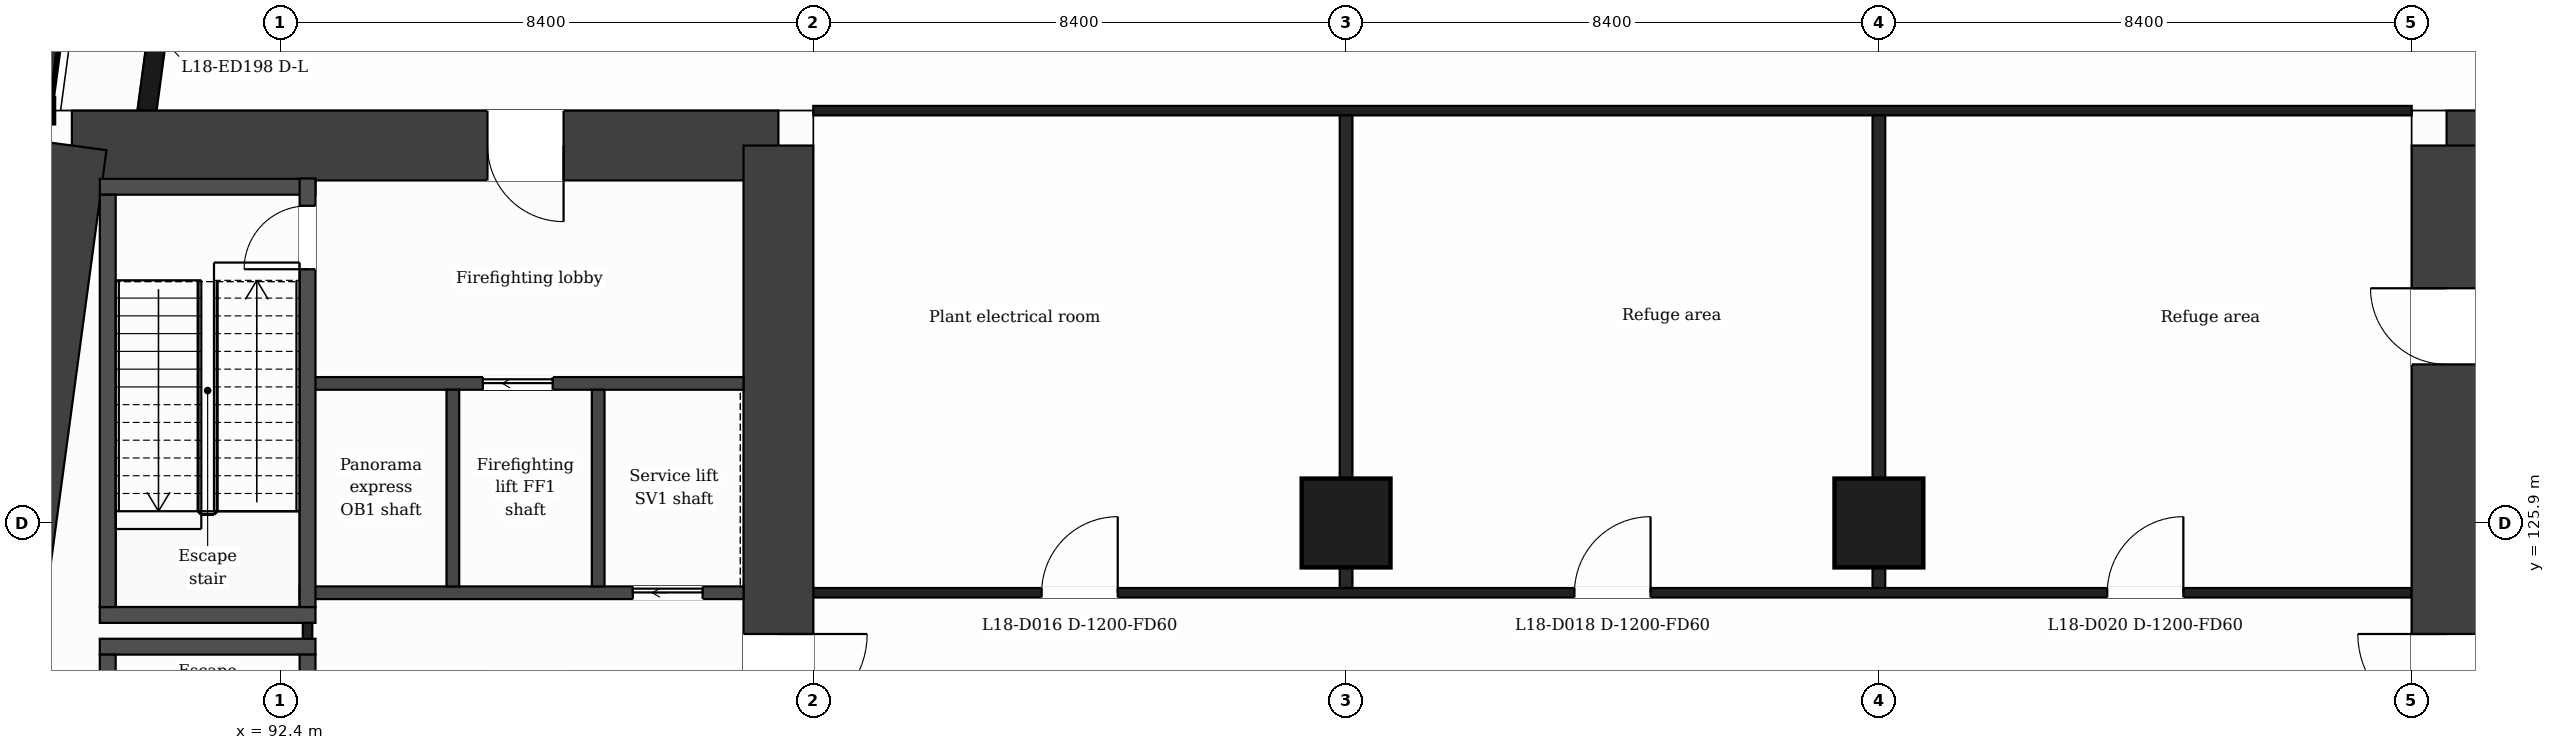
"""IFC4 building model, lengths in metres.
Left out: names, types, materials, properties, quantities, classifications, styles, units other than length and angle.
Written with IfcOpenShell. Run it as: python <this file> out.ifc"""

import sys

from ifc_helpers import new_model, si_unit, direction, frame, frame_2d, origin, origin_2d, place, context, subcontext, project, spatial, rectangle, extrude, element, fill, save


model = new_model("IFC4")
c1 = context("Model", 3, precision=1e-05, world=origin(), true_north=direction((0.0, 1.0)))
c2 = subcontext(c1, "Body", "Model", "MODEL_VIEW")
j1 = project(units=[si_unit("LENGTHUNIT", "METRE"), si_unit("PLANEANGLEUNIT", "RADIAN")], contexts=[c1])
p1 = place(None, origin())
s1 = spatial("IfcSite", under=j1, at=p1, CompositionType="ELEMENT")
p2 = place(p1, origin())
s2 = spatial("IfcBuilding", under=s1, at=p2, CompositionType="ELEMENT")
p3 = place(p2, frame((0.0, 0.0, 81.0)))
s3 = spatial("IfcBuildingStorey", under=s2, at=p3, CompositionType="ELEMENT", Elevation=81.0)
p4 = place(p3, frame((89.112, 131.85, 0.0), z_axis=(0.0, 0.0, 1.0), x_axis=(1.0, 0.0, 0.0)))
e1 = element("IfcWall", 1, at=p4, inside=s3, PredefinedType="SHEAR", context=c2, shape_type="SweptSolid", body=[
    extrude(rectangle(XDim=11.138, YDim=1.1, at=frame_2d((5.569, 0.0))), origin(), (0.0, 0.0, 1.0), 5.0),
])
p5 = place(p4, frame((6.552, 0.0, 0.0)))
e2 = element("IfcOpeningElement", 2, at=p5, cuts=e1, PredefinedType="OPENING", context=c2, shape_type="SweptSolid", body=[
    extrude(rectangle(XDim=1.2, YDim=2.1, at=frame_2d((0.6, 1.05))), frame((0.0, 0.56, 0.0), z_axis=(0.0, -1.0, 0.0), x_axis=(1.0, 0.0, 0.0)), (0.0, 0.0, 1.0), 1.12),
])
p6 = place(p3, frame((100.25, 131.85, 0.0), z_axis=(0.0, 0.0, 1.0), x_axis=(0.0, -1.0, 0.0)))
e3 = element("IfcWall", 3, at=p6, inside=s3, PredefinedType="SHEAR", context=c2, shape_type="SweptSolid", body=[
    extrude(rectangle(XDim=20.9, YDim=1.1, at=frame_2d((10.45, 0.0))), origin(), (0.0, 0.0, 1.0), 5.0),
])
p7 = place(p6, frame((18.55, 0.0, 0.0)))
e4 = element("IfcOpeningElement", 4, at=p7, cuts=e3, PredefinedType="OPENING", context=c2, shape_type="SweptSolid", body=[
    extrude(rectangle(XDim=1.2, YDim=2.1, at=frame_2d((0.6, 1.05))), frame((0.0, 0.56, 0.0), z_axis=(0.0, -1.0, 0.0), x_axis=(1.0, 0.0, 0.0)), (0.0, 0.0, 1.0), 1.12),
])
p8 = place(p6, frame((7.7, 0.0, 0.0)))
e5 = element("IfcOpeningElement", 5, at=p8, cuts=e3, PredefinedType="OPENING", context=c2, shape_type="SweptSolid", body=[
    extrude(rectangle(XDim=1.4, YDim=2.1, at=frame_2d((0.7, 1.05))), frame((0.0, 0.56, 0.0), z_axis=(0.0, -1.0, 0.0), x_axis=(1.0, 0.0, 0.0)), (0.0, 0.0, 1.0), 1.12),
])
p9 = place(p3, frame((86.298, 110.95, 0.0), z_axis=(0.0, 0.0, 1.0), x_axis=(0.133400422634, 0.99106222168, 0.0)))
e6 = element("IfcWall", 6, at=p9, inside=s3, PredefinedType="SHEAR", context=c2, shape_type="SweptSolid", body=[
    extrude(rectangle(XDim=21.089, YDim=1.1, at=frame_2d((10.544, 0.0))), origin(), (0.0, 0.0, 1.0), 5.0),
])
p10 = place(p3, frame((126.55, 131.85, 0.0), z_axis=(0.0, 0.0, 1.0), x_axis=(1.0, 0.0, 0.0)))
e7 = element("IfcWall", 7, at=p10, inside=s3, PredefinedType="SHEAR", context=c2, shape_type="SweptSolid", body=[
    extrude(rectangle(XDim=11.138, YDim=1.1, at=frame_2d((5.569, 0.0))), origin(), (0.0, 0.0, 1.0), 5.0),
])
p11 = place(p10, frame((3.386, 0.0, 0.0)))
e8 = element("IfcOpeningElement", 8, at=p11, cuts=e7, PredefinedType="OPENING", context=c2, shape_type="SweptSolid", body=[
    extrude(rectangle(XDim=1.2, YDim=2.1, at=frame_2d((0.6, 1.05))), frame((0.0, 0.56, 0.0), z_axis=(0.0, -1.0, 0.0), x_axis=(1.0, 0.0, 0.0)), (0.0, 0.0, 1.0), 1.12),
])
p12 = place(p3, frame((126.55, 110.95, 0.0), z_axis=(0.0, 0.0, 1.0), x_axis=(0.0, 1.0, 0.0)))
e9 = element("IfcWall", 9, at=p12, inside=s3, PredefinedType="SHEAR", context=c2, shape_type="SweptSolid", body=[
    extrude(rectangle(XDim=20.9, YDim=1.1, at=frame_2d((10.45, 0.0))), origin(), (0.0, 0.0, 1.0), 5.0),
])
p13 = place(p12, frame((17.45, 0.0, 0.0)))
e10 = element("IfcOpeningElement", 10, at=p13, cuts=e9, PredefinedType="OPENING", context=c2, shape_type="SweptSolid", body=[
    extrude(rectangle(XDim=1.2, YDim=2.1, at=frame_2d((0.6, 1.05))), frame((0.0, 0.56, 0.0), z_axis=(0.0, -1.0, 0.0), x_axis=(1.0, 0.0, 0.0)), (0.0, 0.0, 1.0), 1.12),
])
p14 = place(p12, frame((11.8, 0.0, 0.0)))
e11 = element("IfcOpeningElement", 11, at=p14, cuts=e9, PredefinedType="OPENING", context=c2, shape_type="SweptSolid", body=[
    extrude(rectangle(XDim=1.4, YDim=2.1, at=frame_2d((0.7, 1.05))), frame((0.0, 0.56, 0.0), z_axis=(0.0, -1.0, 0.0), x_axis=(1.0, 0.0, 0.0)), (0.0, 0.0, 1.0), 1.12),
])
for number, where, z_axis, x_axis in (
    (12, (109.2, 125.9, 0.0), (0.0, 0.0, 1.0), (1.0, 0.0, 0.0)),
    (13, (117.6, 125.9, 0.0), (0.0, 0.0, 1.0), (1.0, 0.0, 0.0)),
):
    element("IfcColumn", number, at=place(p3, frame(where, z_axis=z_axis, x_axis=x_axis)), inside=s3, PredefinedType="COLUMN", context=c2, shape_type="SweptSolid", body=[
        extrude(rectangle(XDim=1.4, YDim=1.4, at=origin_2d()), origin(), (0.0, 0.0, 1.0), 5.0),
    ])
p15 = place(p3, frame((91.177, 138.95, 0.0), z_axis=(0.0, 0.0, 1.0), x_axis=(-0.133426664613, -0.991058689065, 0.0)))
e14 = element("IfcWall", 14, at=p15, inside=s3, PredefinedType="SOLIDWALL", context=c2, shape_type="SweptSolid", body=[
    extrude(rectangle(XDim=6.609, YDim=0.3, at=frame_2d((3.305, 0.0))), origin(), (0.0, 0.0, 1.0), 4.55),
])
p16 = place(p15, frame((4.294, 0.0, 0.0)))
e15 = element("IfcOpeningElement", 15, at=p16, cuts=e14, PredefinedType="OPENING", context=c2, shape_type="SweptSolid", body=[
    extrude(rectangle(XDim=1.2, YDim=2.4, at=frame_2d((0.6, 1.2))), frame((0.0, 0.16, 0.0), z_axis=(0.0, -1.0, 0.0), x_axis=(1.0, 0.0, 0.0)), (0.0, 0.0, 1.0), 0.32),
])
for number, where, z_axis, x_axis in (
    (16, (89.552, 123.95, 0.0), (0.0, 0.0, 1.0), (1.0, 0.0, 0.0)),
    (17, (89.552, 124.45, 0.0), (0.0, 0.0, 1.0), (1.0, 0.0, 0.0)),
):
    element("IfcWall", number, at=place(p3, frame(where, z_axis=z_axis, x_axis=x_axis)), inside=s3, PredefinedType="PARTITIONING", context=c2, shape_type="SweptSolid", body=[
        extrude(rectangle(XDim=3.4, YDim=0.25, at=frame_2d((1.7, 0.0))), origin(), (0.0, 0.0, 1.0), 4.55),
    ])
p17 = place(p3, frame((92.702, 124.8, 0.0), z_axis=(0.0, 0.0, 1.0), x_axis=(1.0, 0.0, 0.0)))
e18 = element("IfcWall", 18, at=p17, inside=s3, PredefinedType="PARTITIONING", context=c2, shape_type="SweptSolid", body=[
    extrude(rectangle(XDim=6.998, YDim=0.2, at=frame_2d((3.499, 0.0))), origin(), (0.0, 0.0, 1.0), 4.55),
])
p18 = place(p17, frame((5.253, 0.0, 0.0)))
e19 = element("IfcOpeningElement", 19, at=p18, cuts=e18, PredefinedType="OPENING", context=c2, shape_type="SweptSolid", body=[
    extrude(rectangle(XDim=1.1, YDim=2.1, at=frame_2d((0.55, 1.05))), frame((0.0, 0.11, 0.0), z_axis=(0.0, -1.0, 0.0), x_axis=(1.0, 0.0, 0.0)), (0.0, 0.0, 1.0), 0.22),
])
p19 = place(p3, frame((100.8, 124.8, 0.0), z_axis=(0.0, 0.0, 1.0), x_axis=(1.0, 0.0, 0.0)))
e20 = element("IfcWall", 20, at=p19, inside=s3, PredefinedType="PARTITIONING", context=c2, shape_type="SweptSolid", body=[
    extrude(rectangle(XDim=25.2, YDim=0.15, at=frame_2d((12.6, 0.0))), origin(), (0.0, 0.0, 1.0), 4.55),
])
p20 = place(p19, frame((3.6, 0.0, 0.0)))
e21 = element("IfcOpeningElement", 21, at=p20, cuts=e20, PredefinedType="OPENING", context=c2, shape_type="SweptSolid", body=[
    extrude(rectangle(XDim=1.2, YDim=2.1, at=frame_2d((0.6, 1.05))), frame((0.0, 0.085, 0.0), z_axis=(0.0, -1.0, 0.0), x_axis=(1.0, 0.0, 0.0)), (0.0, 0.0, 1.0), 0.17),
])
p21 = place(p19, frame((12.0, 0.0, 0.0)))
e22 = element("IfcOpeningElement", 22, at=p21, cuts=e20, PredefinedType="OPENING", context=c2, shape_type="SweptSolid", body=[
    extrude(rectangle(XDim=1.2, YDim=2.1, at=frame_2d((0.6, 1.05))), frame((0.0, 0.085, 0.0), z_axis=(0.0, -1.0, 0.0), x_axis=(1.0, 0.0, 0.0)), (0.0, 0.0, 1.0), 0.17),
])
p22 = place(p19, frame((20.4, 0.0, 0.0)))
e23 = element("IfcOpeningElement", 23, at=p22, cuts=e20, PredefinedType="OPENING", context=c2, shape_type="SweptSolid", body=[
    extrude(rectangle(XDim=1.2, YDim=2.1, at=frame_2d((0.6, 1.05))), frame((0.0, 0.085, 0.0), z_axis=(0.0, -1.0, 0.0), x_axis=(1.0, 0.0, 0.0)), (0.0, 0.0, 1.0), 0.17),
])
p23 = place(p3, frame((92.827, 128.1, 0.0), z_axis=(0.0, 0.0, 1.0), x_axis=(1.0, 0.0, 0.0)))
e24 = element("IfcWall", 24, at=p23, inside=s3, PredefinedType="PARTITIONING", context=c2, shape_type="SweptSolid", body=[
    extrude(rectangle(XDim=6.873, YDim=0.2, at=frame_2d((3.437, 0.0))), origin(), (0.0, 0.0, 1.0), 4.55),
])
p24 = place(p23, frame((2.764, 0.0, 0.0)))
e25 = element("IfcOpeningElement", 25, at=p24, cuts=e24, PredefinedType="OPENING", context=c2, shape_type="SweptSolid", body=[
    extrude(rectangle(XDim=1.1, YDim=2.1, at=frame_2d((0.55, 1.05))), frame((0.0, 0.11, 0.0), z_axis=(0.0, -1.0, 0.0), x_axis=(1.0, 0.0, 0.0)), (0.0, 0.0, 1.0), 0.22),
])
p25 = place(p3, frame((89.552, 131.2, 0.0), z_axis=(0.0, 0.0, 1.0), x_axis=(1.0, 0.0, 0.0)))
e26 = element("IfcWall", 26, at=p25, inside=s3, PredefinedType="PARTITIONING", context=c2, shape_type="SweptSolid", body=[
    extrude(rectangle(XDim=3.4, YDim=0.25, at=frame_2d((1.7, 0.0))), origin(), (0.0, 0.0, 1.0), 4.55),
])
p26 = place(p3, frame((100.8, 132.4, 0.0), z_axis=(0.0, 0.0, 1.0), x_axis=(1.0, 0.0, 0.0)))
e27 = element("IfcWall", 27, at=p26, inside=s3, PredefinedType="PARTITIONING", context=c2, shape_type="SweptSolid", body=[
    extrude(rectangle(XDim=25.2, YDim=0.15, at=frame_2d((12.6, 0.0))), origin(), (0.0, 0.0, 1.0), 4.55),
])
p27 = place(p3, frame((89.677, 117.07, 0.0), z_axis=(0.0, 0.0, 1.0), x_axis=(0.0, 1.0, 0.0)))
e28 = element("IfcWall", 28, at=p27, inside=s3, PredefinedType="PARTITIONING", context=c2, shape_type="SweptSolid", body=[
    extrude(rectangle(XDim=6.755, YDim=0.25, at=frame_2d((3.377, 0.0))), origin(), (0.0, 0.0, 1.0), 4.55),
])
p28 = place(p3, frame((89.677, 124.575, 0.0), z_axis=(0.0, 0.0, 1.0), x_axis=(0.0, 1.0, 0.0)))
e29 = element("IfcWall", 29, at=p28, inside=s3, PredefinedType="PARTITIONING", context=c2, shape_type="SweptSolid", body=[
    extrude(rectangle(XDim=6.5, YDim=0.25, at=frame_2d((3.25, 0.0))), origin(), (0.0, 0.0, 1.0), 4.55),
])
p29 = place(p3, frame((92.827, 124.075, 0.0), z_axis=(0.0, 0.0, 1.0), x_axis=(0.0, 1.0, 0.0)))
e30 = element("IfcWall", 30, at=p29, inside=s3, PredefinedType="PARTITIONING", context=c2, shape_type="SweptSolid", body=[
    extrude(rectangle(XDim=0.25, YDim=0.15, at=frame_2d((0.125, 0.0))), origin(), (0.0, 0.0, 1.0), 4.55),
])
p30 = place(p3, frame((92.827, 117.07, 0.0), z_axis=(0.0, 0.0, 1.0), x_axis=(0.0, 1.0, 0.0)))
e31 = element("IfcWall", 31, at=p30, inside=s3, PredefinedType="PARTITIONING", context=c2, shape_type="SweptSolid", body=[
    extrude(rectangle(XDim=6.755, YDim=0.25, at=frame_2d((3.377, 0.0))), origin(), (0.0, 0.0, 1.0), 4.55),
])
p31 = place(p30, frame((5.455, 0.0, 0.0)))
e32 = element("IfcOpeningElement", 32, at=p31, cuts=e31, PredefinedType="OPENING", context=c2, shape_type="SweptSolid", body=[
    extrude(rectangle(XDim=0.95, YDim=2.1, at=frame_2d((0.475, 1.05))), frame((0.0, 0.135, 0.0), z_axis=(0.0, -1.0, 0.0), x_axis=(1.0, 0.0, 0.0)), (0.0, 0.0, 1.0), 0.27),
])
p32 = place(p3, frame((92.827, 124.575, 0.0), z_axis=(0.0, 0.0, 1.0), x_axis=(0.0, 1.0, 0.0)))
e33 = element("IfcWall", 33, at=p32, inside=s3, PredefinedType="PARTITIONING", context=c2, shape_type="SweptSolid", body=[
    extrude(rectangle(XDim=6.755, YDim=0.25, at=frame_2d((3.377, 0.0))), origin(), (0.0, 0.0, 1.0), 4.55),
])
p33 = place(p32, frame((5.325, 0.0, 0.0)))
e34 = element("IfcOpeningElement", 34, at=p33, cuts=e33, PredefinedType="OPENING", context=c2, shape_type="SweptSolid", body=[
    extrude(rectangle(XDim=1.0, YDim=2.1, at=frame_2d((0.5, 1.05))), frame((0.0, 0.135, 0.0), z_axis=(0.0, -1.0, 0.0), x_axis=(1.0, 0.0, 0.0)), (0.0, 0.0, 1.0), 0.27),
])
for number, where, z_axis, x_axis in (
    (35, (95.118, 124.9, 0.0), (0.0, 0.0, 1.0), (0.0, 1.0, 0.0)),
    (36, (97.409, 124.9, 0.0), (0.0, 0.0, 1.0), (0.0, 1.0, 0.0)),
):
    element("IfcWall", number, at=place(p3, frame(where, z_axis=z_axis, x_axis=x_axis)), inside=s3, PredefinedType="PARTITIONING", context=c2, shape_type="SweptSolid", body=[
        extrude(rectangle(XDim=3.1, YDim=0.2, at=frame_2d((1.55, 0.0))), origin(), (0.0, 0.0, 1.0), 4.55),
    ])
for number, where, z_axis, x_axis in (
    (37, (109.2, 124.875, 0.0), (0.0, 0.0, 1.0), (0.0, 1.0, 0.0)),
    (38, (117.6, 124.875, 0.0), (0.0, 0.0, 1.0), (0.0, 1.0, 0.0)),
):
    element("IfcWall", number, at=place(p3, frame(where, z_axis=z_axis, x_axis=x_axis)), inside=s3, PredefinedType="PARTITIONING", context=c2, shape_type="SweptSolid", body=[
        extrude(rectangle(XDim=7.45, YDim=0.2, at=frame_2d((3.725, 0.0))), origin(), (0.0, 0.0, 1.0), 4.55),
    ])
p34 = place(p20, origin())
e39 = element("IfcDoor", 39, at=p34, inside=s3, OperationType="SINGLE_SWING_RIGHT", PredefinedType="DOOR", context=c2, shape_type="SweptSolid", body=[
    extrude(rectangle(XDim=1.2, YDim=2.1, at=frame_2d((0.6, 1.05))), frame((0.0, 0.025, 0.0), z_axis=(0.0, -1.0, 0.0), x_axis=(1.0, 0.0, 0.0)), (0.0, 0.0, 1.0), 0.05),
])
fill(e21, e39)
p35 = place(p21, origin())
e40 = element("IfcDoor", 40, at=p35, inside=s3, OperationType="SINGLE_SWING_RIGHT", PredefinedType="DOOR", context=c2, shape_type="SweptSolid", body=[
    extrude(rectangle(XDim=1.2, YDim=2.1, at=frame_2d((0.6, 1.05))), frame((0.0, 0.025, 0.0), z_axis=(0.0, -1.0, 0.0), x_axis=(1.0, 0.0, 0.0)), (0.0, 0.0, 1.0), 0.05),
])
fill(e22, e40)
p36 = place(p22, origin())
e41 = element("IfcDoor", 41, at=p36, inside=s3, OperationType="SINGLE_SWING_RIGHT", PredefinedType="DOOR", context=c2, shape_type="SweptSolid", body=[
    extrude(rectangle(XDim=1.2, YDim=2.1, at=frame_2d((0.6, 1.05))), frame((0.0, 0.025, 0.0), z_axis=(0.0, -1.0, 0.0), x_axis=(1.0, 0.0, 0.0)), (0.0, 0.0, 1.0), 0.05),
])
fill(e23, e41)
p37 = place(p24, origin())
e42 = element("IfcDoor", 42, at=p37, inside=s3, OperationType="SLIDING_TO_LEFT", PredefinedType="DOOR", context=c2, shape_type="SweptSolid", body=[
    extrude(rectangle(XDim=1.1, YDim=2.1, at=frame_2d((0.55, 1.05))), frame((0.0, 0.025, 0.0), z_axis=(0.0, -1.0, 0.0), x_axis=(1.0, 0.0, 0.0)), (0.0, 0.0, 1.0), 0.05),
])
fill(e25, e42)
p38 = place(p18, origin())
e43 = element("IfcDoor", 43, at=p38, inside=s3, OperationType="SLIDING_TO_LEFT", PredefinedType="DOOR", context=c2, shape_type="SweptSolid", body=[
    extrude(rectangle(XDim=1.1, YDim=2.1, at=frame_2d((0.55, 1.05))), frame((0.0, 0.025, 0.0), z_axis=(0.0, -1.0, 0.0), x_axis=(1.0, 0.0, 0.0)), (0.0, 0.0, 1.0), 0.05),
])
fill(e19, e43)
p39 = place(p33, origin())
e44 = element("IfcDoor", 44, at=p39, inside=s3, OperationType="SINGLE_SWING_LEFT", PredefinedType="DOOR", context=c2, shape_type="SweptSolid", body=[
    extrude(rectangle(XDim=1.0, YDim=2.1, at=frame_2d((0.5, 1.05))), frame((0.0, 0.025, 0.0), z_axis=(0.0, -1.0, 0.0), x_axis=(1.0, 0.0, 0.0)), (0.0, 0.0, 1.0), 0.05),
])
fill(e34, e44)
p40 = place(p13, origin())
e45 = element("IfcDoor", 45, at=p40, inside=s3, OperationType="SINGLE_SWING_RIGHT", PredefinedType="DOOR", context=c2, shape_type="SweptSolid", body=[
    extrude(rectangle(XDim=1.2, YDim=2.1, at=frame_2d((0.6, 1.05))), frame((0.0, 0.025, 0.0), z_axis=(0.0, -1.0, 0.0), x_axis=(1.0, 0.0, 0.0)), (0.0, 0.0, 1.0), 0.05),
])
fill(e10, e45)
p41 = place(p5, origin())
e46 = element("IfcDoor", 46, at=p41, inside=s3, OperationType="SINGLE_SWING_RIGHT", PredefinedType="DOOR", context=c2, shape_type="SweptSolid", body=[
    extrude(rectangle(XDim=1.2, YDim=2.1, at=frame_2d((0.6, 1.05))), frame((0.0, 0.025, 0.0), z_axis=(0.0, -1.0, 0.0), x_axis=(1.0, 0.0, 0.0)), (0.0, 0.0, 1.0), 0.05),
])
fill(e2, e46)
p42 = place(p8, origin())
e47 = element("IfcDoor", 47, at=p42, inside=s3, OperationType="SINGLE_SWING_LEFT", PredefinedType="DOOR", context=c2, shape_type="SweptSolid", body=[
    extrude(rectangle(XDim=1.4, YDim=2.1, at=frame_2d((0.7, 1.05))), frame((0.0, 0.025, 0.0), z_axis=(0.0, -1.0, 0.0), x_axis=(1.0, 0.0, 0.0)), (0.0, 0.0, 1.0), 0.05),
])
fill(e5, e47)
p43 = place(p14, origin())
e48 = element("IfcDoor", 48, at=p43, inside=s3, OperationType="SINGLE_SWING_RIGHT", PredefinedType="DOOR", context=c2, shape_type="SweptSolid", body=[
    extrude(rectangle(XDim=1.4, YDim=2.1, at=frame_2d((0.7, 1.05))), frame((0.0, 0.025, 0.0), z_axis=(0.0, -1.0, 0.0), x_axis=(1.0, 0.0, 0.0)), (0.0, 0.0, 1.0), 0.05),
])
fill(e11, e48)
save(model, sys.argv[1])
